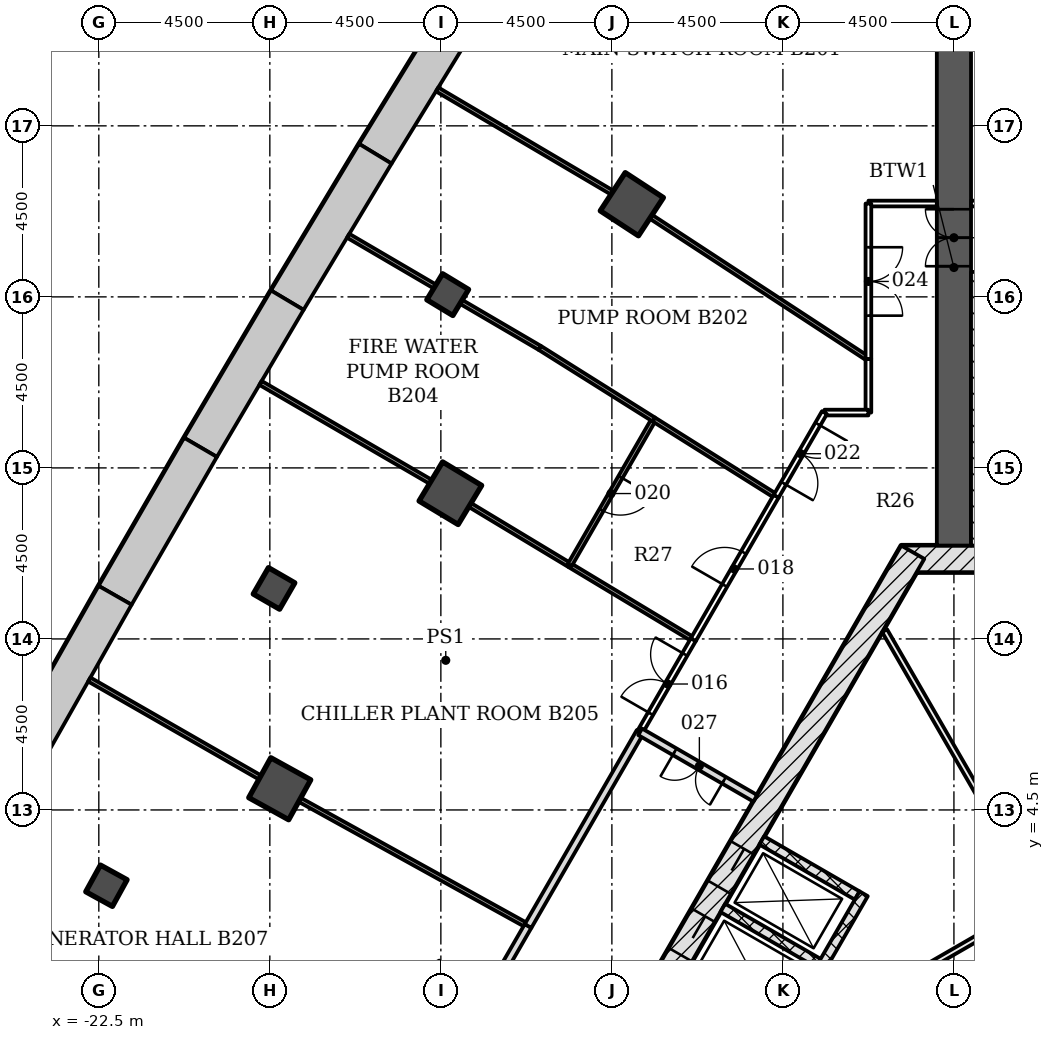
"""IFC4 building model, lengths in metres.
Left out: names, types, materials, properties, quantities, classifications, styles, units other than length and angle.
Written with IfcOpenShell. Run it as: python <this file> out.ifc"""

import sys

from ifc_helpers import new_model, si_unit, direction, frame, frame_2d, origin, origin_2d, place, context, subcontext, project, spatial, polyline, rectangle, outline, extrude, element, fill, save


model = new_model("IFC4")
c1 = context("Model", 3, precision=1e-05, world=origin(), true_north=direction((0.0, 1.0)))
c2 = subcontext(c1, "Body", "Model", "MODEL_VIEW")
j1 = project(units=[si_unit("LENGTHUNIT", "METRE"), si_unit("PLANEANGLEUNIT", "RADIAN")], contexts=[c1])
p1 = place(None, origin())
s1 = spatial("IfcSite", under=j1, at=p1, CompositionType="ELEMENT")
p2 = place(p1, origin())
s2 = spatial("IfcBuilding", under=s1, at=p2, CompositionType="ELEMENT")
p3 = place(p2, frame((0.0, 0.0, -9.0)))
s3 = spatial("IfcBuildingStorey", under=s2, at=p3, CompositionType="ELEMENT", Elevation=-9.0)
p4 = place(p3, origin())
e1 = element("IfcWall", 1, at=p4, inside=s3, PredefinedType="SOLIDWALL", context=c2, shape_type="SweptSolid", body=[
    extrude(outline(polyline([(-13.297, 25.861), (-15.652, 22.026), (-14.797, 21.506), (-12.448, 25.334), (-13.297, 25.861)])), origin(), (0.0, 0.0, 1.0), 4.2),
])
p5 = place(p3, origin())
e2 = element("IfcWall", 2, at=p5, inside=s3, PredefinedType="SOLIDWALL", context=c2, shape_type="SweptSolid", body=[
    extrude(outline(polyline([(-15.652, 22.026), (-17.971, 18.17), (-17.112, 17.658), (-14.797, 21.506), (-15.652, 22.026)])), origin(), (0.0, 0.0, 1.0), 4.2),
])
p6 = place(p3, origin())
e3 = element("IfcWall", 3, at=p6, inside=s3, PredefinedType="SOLIDWALL", context=c2, shape_type="SweptSolid", body=[
    extrude(outline(polyline([(-17.971, 18.17), (-20.256, 14.293), (-19.393, 13.789), (-17.112, 17.658), (-17.971, 18.17)])), origin(), (0.0, 0.0, 1.0), 4.2),
])
p7 = place(p3, origin())
e4 = element("IfcWall", 4, at=p7, inside=s3, PredefinedType="SOLIDWALL", context=c2, shape_type="SweptSolid", body=[
    extrude(outline(polyline([(-20.256, 14.293), (-22.506, 10.396), (-21.638, 9.9), (-19.393, 13.789), (-20.256, 14.293)])), origin(), (0.0, 0.0, 1.0), 4.2),
])
p8 = place(p3, origin())
e5 = element("IfcWall", 5, at=p8, inside=s3, PredefinedType="SOLIDWALL", context=c2, shape_type="SweptSolid", body=[
    extrude(outline(polyline([(-22.506, 10.396), (-24.721, 6.479), (-23.848, 5.99), (-21.638, 9.9), (-22.506, 10.396)])), origin(), (0.0, 0.0, 1.0), 4.2),
])
for number, where, z_axis, x_axis in (
    (6, (-8.475, 20.438, -0.3), (0.0, 0.0, 1.0), (-0.837, 0.547, 0.0)),
    (7, (-13.25, 12.834, -0.3), (0.0, 0.0, 1.0), (-0.857, 0.516, 0.0)),
    (8, (-17.739, 5.058, -0.3), (0.0, 0.0, 1.0), (-0.875, 0.484, 0.0)),
):
    element("IfcColumn", number, at=place(p3, frame(where, z_axis=z_axis, x_axis=x_axis)), inside=s3, PredefinedType="COLUMN", context=c2, shape_type="SweptSolid", body=[
        extrude(rectangle(XDim=1.2, YDim=1.2, at=origin_2d()), origin(), (0.0, 0.0, 1.0), 4.5),
    ])
for number, where, z_axis, x_axis in (
    (9, (-13.32, 18.059, -0.3), (0.0, 0.0, 1.0), (-0.856, 0.518, 0.0)),
    (10, (-17.89, 10.329, -0.3), (0.0, 0.0, 1.0), (-0.866, 0.5, 0.0)),
    (11, (-22.3, 2.506, -0.3), (0.0, 0.0, 1.0), (-0.876, 0.482, 0.0)),
):
    element("IfcColumn", number, at=place(p3, frame(where, z_axis=z_axis, x_axis=x_axis)), inside=s3, PredefinedType="COLUMN", context=c2, shape_type="SweptSolid", body=[
        extrude(rectangle(XDim=0.8, YDim=0.8, at=origin_2d()), origin(), (0.0, 0.0, 1.0), 4.5),
    ])
p9 = place(p3, frame((1.386, 11.106, -0.3), z_axis=(0.0, 0.0, 1.0), x_axis=(-1.0, 0.0, 0.0)))
e12 = element("IfcWall", 12, at=p9, inside=s3, PredefinedType="SHEAR", context=c2, shape_type="SweptSolid", body=[
    extrude(rectangle(XDim=2.771, YDim=0.7, at=frame_2d((1.386, 0.0))), origin(), (0.0, 0.0, 1.0), 4.5),
])
p10 = place(p3, frame((-1.083, 11.281, -0.3), z_axis=(0.0, 0.0, 1.0), x_axis=(-0.500001446645, -0.866024568562, 0.0)))
e13 = element("IfcWall", 13, at=p10, inside=s3, PredefinedType="SHEAR", context=c2, shape_type="SweptSolid", body=[
    extrude(rectangle(XDim=18.458, YDim=0.7, at=frame_2d((9.229, 0.0))), origin(), (0.0, 0.0, 1.0), 4.5),
])
p11 = place(p10, frame((8.979, 0.0, 0.3)))
e14 = element("IfcOpeningElement", 14, at=p11, cuts=e13, PredefinedType="OPENING", context=c2, shape_type="SweptSolid", body=[
    extrude(rectangle(XDim=1.2, YDim=2.1, at=frame_2d((0.6, 1.05))), frame((0.0, 0.36, 0.0), z_axis=(0.0, -1.0, 0.0), x_axis=(1.0, 0.0, 0.0)), (0.0, 0.0, 1.0), 0.72),
])
p12 = place(p10, frame((11.029, 0.0, 0.3)))
e15 = element("IfcOpeningElement", 15, at=p12, cuts=e13, PredefinedType="OPENING", context=c2, shape_type="SweptSolid", body=[
    extrude(rectangle(XDim=1.2, YDim=2.1, at=frame_2d((0.6, 1.05))), frame((0.0, 0.36, 0.0), z_axis=(0.0, -1.0, 0.0), x_axis=(1.0, 0.0, 0.0)), (0.0, 0.0, 1.0), 0.72),
])
p13 = place(p3, frame((0.0, 11.456, -0.3), z_axis=(0.0, 0.0, 1.0), x_axis=(0.0, 1.0, 0.0)))
e16 = element("IfcWall", 16, at=p13, inside=s3, PredefinedType="SHEAR", context=c2, shape_type="SweptSolid", body=[
    extrude(rectangle(XDim=14.633, YDim=0.9, at=frame_2d((7.316, 0.0))), origin(), (0.0, 0.0, 1.0), 4.5),
])
p14 = place(p13, frame((7.35, 0.0, 0.3)))
e17 = element("IfcOpeningElement", 17, at=p14, cuts=e16, PredefinedType="OPENING", context=c2, shape_type="SweptSolid", body=[
    extrude(rectangle(XDim=1.5, YDim=2.1, at=frame_2d((0.75, 1.05))), frame((0.0, 0.46, 0.0), z_axis=(0.0, -1.0, 0.0), x_axis=(1.0, 0.0, 0.0)), (0.0, 0.0, 1.0), 0.92),
])
for number, where, z_axis, x_axis in (
    (18, (-5.056, 3.699, 0.0), (0.0, 0.0, 1.0), (0.866, -0.5, 0.0)),
    (19, (-6.081, 1.923, 0.0), (0.0, 0.0, 1.0), (0.866, -0.5, 0.0)),
):
    element("IfcWall", number, at=place(p3, frame(where, z_axis=z_axis, x_axis=x_axis)), inside=s3, PredefinedType="PARTITIONING", context=c2, shape_type="SweptSolid", body=[
        extrude(rectangle(XDim=2.9, YDim=0.25, at=frame_2d((1.45, 0.0))), origin(), (0.0, 0.0, 1.0), 4.2),
    ])
p15 = place(p3, frame((-2.374, 2.294, 0.0), z_axis=(0.0, 0.0, 1.0), x_axis=(-0.499996127374, -0.866027639635, 0.0)))
e20 = element("IfcWall", 20, at=p15, inside=s3, PredefinedType="PARTITIONING", context=c2, shape_type="SweptSolid", body=[
    extrude(rectangle(XDim=4.35, YDim=0.25, at=frame_2d((2.175, 0.0))), origin(), (0.0, 0.0, 1.0), 4.2),
])
p16 = place(p3, frame((-9.651, -4.797, 0.0), z_axis=(0.0, 0.0, 1.0), x_axis=(0.866023073213, 0.500004036646, 0.0)))
e21 = element("IfcWall", 21, at=p16, inside=s3, PredefinedType="PARTITIONING", context=c2, shape_type="SweptSolid", body=[
    extrude(rectangle(XDim=13.785, YDim=0.15, at=frame_2d((6.892, 0.0))), origin(), (0.0, 0.0, 1.0), 4.2),
])
p17 = place(p16, frame((7.934, 0.0, 0.0)))
e22 = element("IfcOpeningElement", 22, at=p17, cuts=e21, PredefinedType="OPENING", context=c2, shape_type="SweptSolid", body=[
    extrude(rectangle(XDim=0.9, YDim=2.1, at=frame_2d((0.45, 1.05))), frame((0.0, 0.085, 0.0), z_axis=(0.0, -1.0, 0.0), x_axis=(1.0, 0.0, 0.0)), (0.0, 0.0, 1.0), 0.17),
])
p18 = place(p3, frame((-6.366, -4.517, 0.0), z_axis=(0.0, 0.0, 1.0), x_axis=(0.866023831006, 0.500002724122, 0.0)))
e23 = element("IfcWall", 23, at=p18, inside=s3, PredefinedType="PARTITIONING", context=c2, shape_type="SweptSolid", body=[
    extrude(rectangle(XDim=14.0, YDim=0.15, at=frame_2d((7.0, 0.0))), origin(), (0.0, 0.0, 1.0), 4.2),
])
p19 = place(p18, frame((4.951, 0.0, 0.0)))
e24 = element("IfcOpeningElement", 24, at=p19, cuts=e23, PredefinedType="OPENING", context=c2, shape_type="SweptSolid", body=[
    extrude(rectangle(XDim=0.9, YDim=2.1, at=frame_2d((0.45, 1.05))), frame((0.0, 0.085, 0.0), z_axis=(0.0, -1.0, 0.0), x_axis=(1.0, 0.0, 0.0)), (0.0, 0.0, 1.0), 0.17),
])
p20 = place(p3, frame((2.137, 2.355, 0.0), z_axis=(0.0, 0.0, 1.0), x_axis=(-0.500009612796, 0.866019853763, 0.0)))
e25 = element("IfcWall", 25, at=p20, inside=s3, PredefinedType="PARTITIONING", context=c2, shape_type="SweptSolid", body=[
    extrude(rectangle(XDim=7.924, YDim=0.15, at=frame_2d((3.962, 0.0))), origin(), (0.0, 0.0, 1.0), 4.2),
])
p21 = place(p3, frame((1.018, 11.456, -0.3), z_axis=(0.0, 0.0, 1.0), x_axis=(0.0, 1.0, 0.0)))
e26 = element("IfcWall", 26, at=p21, inside=s3, PredefinedType="SHEAR", context=c2, shape_type="SweptSolid", body=[
    extrude(rectangle(XDim=7.2, YDim=1.136, at=frame_2d((3.6, 0.0))), origin(), (0.0, 0.0, 1.0), 4.5),
])
p22 = place(p3, frame((-12.635, -1.028, 0.0), z_axis=(0.0, 0.0, 1.0), x_axis=(0.50005725472, 0.865992345233, 0.0)))
e27 = element("IfcWall", 27, at=p22, inside=s3, PredefinedType="PARTITIONING", context=c2, shape_type="SweptSolid", body=[
    extrude(rectangle(XDim=2.862, YDim=0.2, at=frame_2d((1.431, 0.0))), origin(), (0.0, 0.0, 1.0), 3.588),
])
p23 = place(p3, frame((-18.26, 5.356, 0.0), z_axis=(0.0, 0.0, 1.0), x_axis=(-0.867438170848, 0.497544992695, 0.0)))
e28 = element("IfcWall", 28, at=p23, inside=s3, PredefinedType="PARTITIONING", context=c2, shape_type="SweptSolid", body=[
    extrude(rectangle(XDim=5.177, YDim=0.12, at=frame_2d((2.589, 0.0))), origin(), (0.0, 0.0, 1.0), 3.583),
])
p24 = place(p3, frame((-11.208, 1.446, 0.0), z_axis=(0.0, 0.0, 1.0), x_axis=(-0.875125393946, 0.483896212912, 0.0)))
e29 = element("IfcWall", 29, at=p24, inside=s3, PredefinedType="PARTITIONING", context=c2, shape_type="SweptSolid", body=[
    extrude(rectangle(XDim=6.863, YDim=0.12, at=frame_2d((3.432, 0.0))), origin(), (0.0, 0.0, 1.0), 3.588),
])
p25 = place(p3, frame((-8.256, 6.555, 0.0), z_axis=(0.0, 0.0, 1.0), x_axis=(-0.500042467634, -0.866000883696, 0.0)))
e30 = element("IfcWall", 30, at=p25, inside=s3, PredefinedType="PARTITIONING", context=c2, shape_type="SweptSolid", body=[
    extrude(rectangle(XDim=5.899, YDim=0.2, at=frame_2d((2.95, 0.0))), origin(), (0.0, 0.0, 1.0), 3.588),
])
p26 = place(p3, frame((-5.226, 4.806, 0.0), z_axis=(0.0, 0.0, 1.0), x_axis=(-0.865949687125, 0.500131122175, 0.0)))
e31 = element("IfcWall", 31, at=p26, inside=s3, PredefinedType="PARTITIONING", context=c2, shape_type="SweptSolid", body=[
    extrude(rectangle(XDim=3.499, YDim=0.2, at=frame_2d((1.75, 0.0))), origin(), (0.0, 0.0, 1.0), 4.2),
])
p27 = place(p26, frame((0.95, 0.0, 0.0)))
e32 = element("IfcOpeningElement", 32, at=p27, cuts=e31, PredefinedType="OPENING", context=c2, shape_type="SweptSolid", body=[
    extrude(rectangle(XDim=1.5, YDim=2.1, at=frame_2d((0.75, 1.05))), frame((0.0, 0.11, 0.0), z_axis=(0.0, -1.0, 0.0), x_axis=(1.0, 0.0, 0.0)), (0.0, 0.0, 1.0), 0.22),
])
p28 = place(p3, frame((7.136, 20.456, 0.0), z_axis=(0.0, 0.0, 1.0), x_axis=(-1.0, 0.0, 0.0)))
e33 = element("IfcWall", 33, at=p28, inside=s3, PredefinedType="PARTITIONING", context=c2, shape_type="SweptSolid", body=[
    extrude(rectangle(XDim=6.686, YDim=0.15, at=frame_2d((3.343, 0.0))), origin(), (0.0, 0.0, 1.0), 3.588),
])
p29 = place(p28, frame((2.45, 0.0, 0.0)))
e34 = element("IfcOpeningElement", 34, at=p29, cuts=e33, PredefinedType="OPENING", context=c2, shape_type="SweptSolid", body=[
    extrude(rectangle(XDim=1.8, YDim=2.1, at=frame_2d((0.9, 1.05))), frame((0.0, 0.085, 0.0), z_axis=(0.0, -1.0, 0.0), x_axis=(1.0, 0.0, 0.0)), (0.0, 0.0, 1.0), 0.17),
])
p30 = place(p3, frame((-6.857, 8.983, 0.0), z_axis=(0.0, 0.0, 1.0), x_axis=(-0.85673770383, 0.515752369685, 0.0)))
e35 = element("IfcWall", 35, at=p30, inside=s3, PredefinedType="PARTITIONING", context=c2, shape_type="SweptSolid", body=[
    extrude(rectangle(XDim=3.798, YDim=0.12, at=frame_2d((1.899, 0.0))), origin(), (0.0, 0.0, 1.0), 3.588),
])
p31 = place(p3, frame((-8.256, 6.558, 0.0), z_axis=(0.0, 0.0, 1.0), x_axis=(0.500081734942, 0.86597820895, 0.0)))
e36 = element("IfcWall", 36, at=p31, inside=s3, PredefinedType="PARTITIONING", context=c2, shape_type="SweptSolid", body=[
    extrude(rectangle(XDim=2.804, YDim=0.15, at=frame_2d((1.402, 0.0))), origin(), (0.0, 0.0, 1.0), 3.588),
])
p32 = place(p31, frame((0.55, 0.0, 0.0)))
e37 = element("IfcOpeningElement", 37, at=p32, cuts=e36, PredefinedType="OPENING", context=c2, shape_type="SweptSolid", body=[
    extrude(rectangle(XDim=1.8, YDim=2.1, at=frame_2d((0.9, 1.05))), frame((0.0, 0.085, 0.0), z_axis=(0.0, -1.0, 0.0), x_axis=(1.0, 0.0, 0.0)), (0.0, 0.0, 1.0), 0.17),
])
p33 = place(p3, frame((-13.769, 13.135, 0.0), z_axis=(0.0, 0.0, 1.0), x_axis=(-0.864615819332, 0.502433562734, 0.0)))
e38 = element("IfcWall", 38, at=p33, inside=s3, PredefinedType="PARTITIONING", context=c2, shape_type="SweptSolid", body=[
    extrude(rectangle(XDim=5.177, YDim=0.12, at=frame_2d((2.588, 0.0))), origin(), (0.0, 0.0, 1.0), 3.583),
])
p34 = place(p3, frame((-10.112, 10.943, 0.0), z_axis=(0.0, 0.0, 1.0), x_axis=(-0.856570361658, 0.516030246719, 0.0)))
e39 = element("IfcWall", 39, at=p34, inside=s3, PredefinedType="PARTITIONING", context=c2, shape_type="SweptSolid", body=[
    extrude(rectangle(XDim=3.063, YDim=0.12, at=frame_2d((1.532, 0.0))), origin(), (0.0, 0.0, 1.0), 3.588),
])
p35 = place(p3, frame((-6.858, 8.979, 0.0), z_axis=(0.0, 0.0, 1.0), x_axis=(0.500105111742, 0.865964708986, 0.0)))
e40 = element("IfcWall", 40, at=p35, inside=s3, PredefinedType="PARTITIONING", context=c2, shape_type="SweptSolid", body=[
    extrude(rectangle(XDim=4.363, YDim=0.15, at=frame_2d((2.181, 0.0))), origin(), (0.0, 0.0, 1.0), 3.588),
])
p36 = place(p35, frame((1.65, 0.0, 0.0)))
e41 = element("IfcOpeningElement", 41, at=p36, cuts=e40, PredefinedType="OPENING", context=c2, shape_type="SweptSolid", body=[
    extrude(rectangle(XDim=1.0, YDim=2.1, at=frame_2d((0.5, 1.05))), frame((0.0, 0.085, 0.0), z_axis=(0.0, -1.0, 0.0), x_axis=(1.0, 0.0, 0.0)), (0.0, 0.0, 1.0), 0.17),
])
p37 = place(p3, frame((-7.899, 14.774, 0.0), z_axis=(0.0, 0.0, 1.0), x_axis=(-0.49990879683, -0.866078053556, 0.0)))
e42 = element("IfcWall", 42, at=p37, inside=s3, PredefinedType="PARTITIONING", context=c2, shape_type="SweptSolid", body=[
    extrude(rectangle(XDim=4.423, YDim=0.12, at=frame_2d((2.211, 0.0))), origin(), (0.0, 0.0, 1.0), 3.588),
])
p38 = place(p37, frame((1.75, 0.0, 0.0)))
e43 = element("IfcOpeningElement", 43, at=p38, cuts=e42, PredefinedType="OPENING", context=c2, shape_type="SweptSolid", body=[
    extrude(rectangle(XDim=1.0, YDim=2.1, at=frame_2d((0.5, 1.05))), frame((0.0, 0.07, 0.0), z_axis=(0.0, -1.0, 0.0), x_axis=(1.0, 0.0, 0.0)), (0.0, 0.0, 1.0), 0.14),
])
p39 = place(p3, frame((-4.68, 12.753, 0.0), z_axis=(0.0, 0.0, 1.0), x_axis=(-0.846850349589, 0.53183125651, 0.0)))
e44 = element("IfcWall", 44, at=p39, inside=s3, PredefinedType="PARTITIONING", context=c2, shape_type="SweptSolid", body=[
    extrude(rectangle(XDim=3.806, YDim=0.12, at=frame_2d((1.903, 0.0))), origin(), (0.0, 0.0, 1.0), 3.588),
])
p40 = place(p3, frame((-2.25, 16.367, 0.0), z_axis=(0.0, 0.0, 1.0), x_axis=(0.0, -1.0, 0.0)))
e45 = element("IfcWall", 45, at=p40, inside=s3, PredefinedType="PARTITIONING", context=c2, shape_type="SweptSolid", body=[
    extrude(rectangle(XDim=1.411, YDim=0.15, at=frame_2d((0.706, 0.0))), origin(), (0.0, 0.0, 1.0), 3.588),
])
p41 = place(p3, frame((-2.25, 14.956, 0.0), z_axis=(0.0, 0.0, 1.0), x_axis=(-1.0, 0.0, 0.0)))
e46 = element("IfcWall", 46, at=p41, inside=s3, PredefinedType="PARTITIONING", context=c2, shape_type="SweptSolid", body=[
    extrude(rectangle(XDim=1.156, YDim=0.15, at=frame_2d((0.578, 0.0))), origin(), (0.0, 0.0, 1.0), 4.2),
])
p42 = place(p3, frame((-3.406, 14.956, 0.0), z_axis=(0.0, 0.0, 1.0), x_axis=(-0.499999364504, -0.866025770688, 0.0)))
e47 = element("IfcWall", 47, at=p42, inside=s3, PredefinedType="PARTITIONING", context=c2, shape_type="SweptSolid", body=[
    extrude(rectangle(XDim=2.544, YDim=0.15, at=frame_2d((1.272, 0.0))), origin(), (0.0, 0.0, 1.0), 3.588),
])
p43 = place(p42, frame((0.35, 0.0, 0.0)))
e48 = element("IfcOpeningElement", 48, at=p43, cuts=e47, PredefinedType="OPENING", context=c2, shape_type="SweptSolid", body=[
    extrude(rectangle(XDim=1.8, YDim=2.1, at=frame_2d((0.9, 1.05))), frame((0.0, 0.085, 0.0), z_axis=(0.0, -1.0, 0.0), x_axis=(1.0, 0.0, 0.0)), (0.0, 0.0, 1.0), 0.17),
])
p44 = place(p3, frame((-0.45, 20.456, 0.0), z_axis=(0.0, 0.0, 1.0), x_axis=(-1.0, 0.0, 0.0)))
e49 = element("IfcWall", 49, at=p44, inside=s3, PredefinedType="PARTITIONING", context=c2, shape_type="SweptSolid", body=[
    extrude(rectangle(XDim=1.8, YDim=0.15, at=frame_2d((0.9, 0.0))), origin(), (0.0, 0.0, 1.0), 3.588),
])
p45 = place(p3, frame((-2.25, 20.456, 0.0), z_axis=(0.0, 0.0, 1.0), x_axis=(0.0, -1.0, 0.0)))
e50 = element("IfcWall", 50, at=p45, inside=s3, PredefinedType="PARTITIONING", context=c2, shape_type="SweptSolid", body=[
    extrude(rectangle(XDim=4.089, YDim=0.15, at=frame_2d((2.044, 0.0))), origin(), (0.0, 0.0, 1.0), 3.588),
])
p46 = place(p45, frame((1.15, 0.0, 0.0)))
e51 = element("IfcOpeningElement", 51, at=p46, cuts=e50, PredefinedType="OPENING", context=c2, shape_type="SweptSolid", body=[
    extrude(rectangle(XDim=1.8, YDim=2.1, at=frame_2d((0.9, 1.05))), frame((0.0, 0.085, 0.0), z_axis=(0.0, -1.0, 0.0), x_axis=(1.0, 0.0, 0.0)), (0.0, 0.0, 1.0), 0.17),
])
p47 = place(p3, frame((-13.658, 18.273, 0.0), z_axis=(0.0, 0.0, 1.0), x_axis=(-0.863057686295, 0.505105365371, 0.0)))
e52 = element("IfcWall", 52, at=p47, inside=s3, PredefinedType="PARTITIONING", context=c2, shape_type="SweptSolid", body=[
    extrude(rectangle(XDim=2.643, YDim=0.12, at=frame_2d((1.321, 0.0))), origin(), (0.0, 0.0, 1.0), 4.2),
])
p48 = place(p3, frame((-7.895, 14.772, 0.0), z_axis=(0.0, 0.0, 1.0), x_axis=(-0.846835904525, 0.53185425711, 0.0)))
e53 = element("IfcWall", 53, at=p48, inside=s3, PredefinedType="PARTITIONING", context=c2, shape_type="SweptSolid", body=[
    extrude(rectangle(XDim=3.546, YDim=0.12, at=frame_2d((1.773, 0.0))), origin(), (0.0, 0.0, 1.0), 3.588),
])
p49 = place(p3, frame((-10.898, 16.658, 0.0), z_axis=(0.0, 0.0, 1.0), x_axis=(-0.863161652457, 0.504927679701, 0.0)))
e54 = element("IfcWall", 54, at=p49, inside=s3, PredefinedType="PARTITIONING", context=c2, shape_type="SweptSolid", body=[
    extrude(rectangle(XDim=2.398, YDim=0.12, at=frame_2d((1.199, 0.0))), origin(), (0.0, 0.0, 1.0), 3.588),
])
p50 = place(p3, frame((-8.992, 20.743, 0.0), z_axis=(0.0, 0.0, 1.0), x_axis=(-0.861446814084, 0.507847798563, 0.0)))
e55 = element("IfcWall", 55, at=p50, inside=s3, PredefinedType="PARTITIONING", context=c2, shape_type="SweptSolid", body=[
    extrude(rectangle(XDim=5.348, YDim=0.12, at=frame_2d((2.674, 0.0))), origin(), (0.0, 0.0, 1.0), 3.583),
])
p51 = place(p3, frame((-2.252, 16.367, 0.0), z_axis=(0.0, 0.0, 1.0), x_axis=(-0.83688089218, 0.547385031129, 0.0)))
e56 = element("IfcWall", 56, at=p51, inside=s3, PredefinedType="PARTITIONING", context=c2, shape_type="SweptSolid", body=[
    extrude(rectangle(XDim=6.836, YDim=0.12, at=frame_2d((3.418, 0.0))), origin(), (0.0, 0.0, 1.0), 3.588),
])
p52 = place(p11, origin())
e57 = element("IfcDoor", 57, at=p52, inside=s3, OperationType="DOUBLE_DOOR_SLIDING", PredefinedType="DOOR", context=c2, shape_type="SweptSolid", body=[
    extrude(rectangle(XDim=1.2, YDim=2.1, at=frame_2d((0.6, 1.05))), frame((0.0, 0.025, 0.0), z_axis=(0.0, -1.0, 0.0), x_axis=(1.0, 0.0, 0.0)), (0.0, 0.0, 1.0), 0.05),
])
fill(e14, e57)
p53 = place(p12, origin())
e58 = element("IfcDoor", 58, at=p53, inside=s3, OperationType="DOUBLE_DOOR_SLIDING", PredefinedType="DOOR", context=c2, shape_type="SweptSolid", body=[
    extrude(rectangle(XDim=1.2, YDim=2.1, at=frame_2d((0.6, 1.05))), frame((0.0, 0.025, 0.0), z_axis=(0.0, -1.0, 0.0), x_axis=(1.0, 0.0, 0.0)), (0.0, 0.0, 1.0), 0.05),
])
fill(e15, e58)
p54 = place(p32, origin())
e59 = element("IfcDoor", 59, at=p54, inside=s3, OperationType="DOUBLE_DOOR_SINGLE_SWING", PredefinedType="DOOR", context=c2, shape_type="SweptSolid", body=[
    extrude(rectangle(XDim=1.8, YDim=2.1, at=frame_2d((0.9, 1.05))), frame((0.0, 0.025, 0.0), z_axis=(0.0, -1.0, 0.0), x_axis=(1.0, 0.0, 0.0)), (0.0, 0.0, 1.0), 0.05),
])
fill(e37, e59)
p55 = place(p36, origin())
e60 = element("IfcDoor", 60, at=p55, inside=s3, OperationType="SINGLE_SWING_LEFT", PredefinedType="DOOR", context=c2, shape_type="SweptSolid", body=[
    extrude(rectangle(XDim=1.0, YDim=2.1, at=frame_2d((0.5, 1.05))), frame((0.0, 0.025, 0.0), z_axis=(0.0, -1.0, 0.0), x_axis=(1.0, 0.0, 0.0)), (0.0, 0.0, 1.0), 0.05),
])
fill(e41, e60)
p56 = place(p38, origin())
e61 = element("IfcDoor", 61, at=p56, inside=s3, OperationType="SINGLE_SWING_LEFT", PredefinedType="DOOR", context=c2, shape_type="SweptSolid", body=[
    extrude(rectangle(XDim=1.0, YDim=2.1, at=frame_2d((0.5, 1.05))), frame((0.0, 0.025, 0.0), z_axis=(0.0, -1.0, 0.0), x_axis=(1.0, 0.0, 0.0)), (0.0, 0.0, 1.0), 0.05),
])
fill(e43, e61)
p57 = place(p43, origin())
e62 = element("IfcDoor", 62, at=p57, inside=s3, OperationType="DOUBLE_DOOR_SINGLE_SWING", PredefinedType="DOOR", context=c2, shape_type="SweptSolid", body=[
    extrude(rectangle(XDim=1.8, YDim=2.1, at=frame_2d((0.9, 1.05))), frame((0.0, 0.025, 0.0), z_axis=(0.0, -1.0, 0.0), x_axis=(1.0, 0.0, 0.0)), (0.0, 0.0, 1.0), 0.05),
])
fill(e48, e62)
p58 = place(p46, origin())
e63 = element("IfcDoor", 63, at=p58, inside=s3, OperationType="DOUBLE_DOOR_SINGLE_SWING", PredefinedType="DOOR", context=c2, shape_type="SweptSolid", body=[
    extrude(rectangle(XDim=1.8, YDim=2.1, at=frame_2d((0.9, 1.05))), frame((0.0, 0.025, 0.0), z_axis=(0.0, -1.0, 0.0), x_axis=(1.0, 0.0, 0.0)), (0.0, 0.0, 1.0), 0.05),
])
fill(e51, e63)
p59 = place(p27, origin())
e64 = element("IfcDoor", 64, at=p59, inside=s3, OperationType="DOUBLE_DOOR_SINGLE_SWING", PredefinedType="DOOR", context=c2, shape_type="SweptSolid", body=[
    extrude(rectangle(XDim=1.5, YDim=2.1, at=frame_2d((0.75, 1.05))), frame((0.0, 0.025, 0.0), z_axis=(0.0, -1.0, 0.0), x_axis=(1.0, 0.0, 0.0)), (0.0, 0.0, 1.0), 0.05),
])
fill(e32, e64)
p60 = place(p14, origin())
e65 = element("IfcDoor", 65, at=p60, inside=s3, OperationType="DOUBLE_DOOR_SINGLE_SWING", PredefinedType="DOOR", context=c2, shape_type="SweptSolid", body=[
    extrude(rectangle(XDim=1.5, YDim=2.1, at=frame_2d((0.75, 1.05))), frame((0.0, 0.025, 0.0), z_axis=(0.0, -1.0, 0.0), x_axis=(1.0, 0.0, 0.0)), (0.0, 0.0, 1.0), 0.05),
])
fill(e17, e65)
save(model, sys.argv[1])
